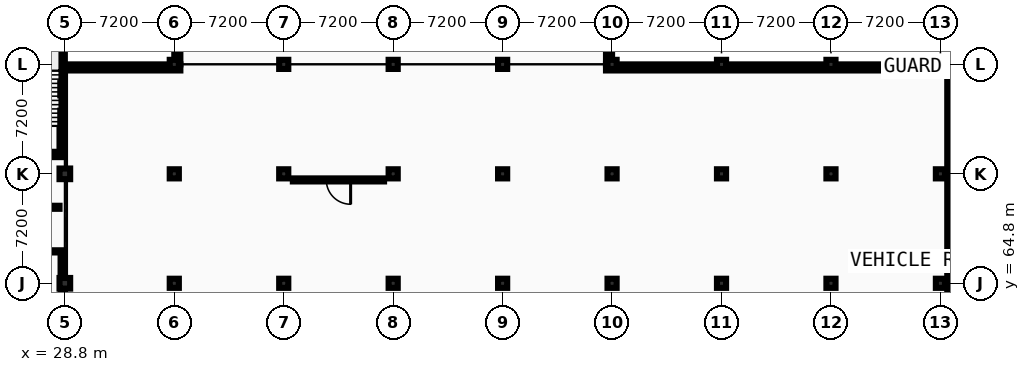
"""IFC4 building model, lengths in metres.
Left out: names, types, materials, properties, quantities, classifications, styles, units other than length and angle.
Written with IfcOpenShell. Run it as: python <this file> out.ifc"""

import sys

from ifc_helpers import new_model, si_unit, direction, frame, frame_2d, origin, origin_2d, place, context, subcontext, project, spatial, rectangle, extrude, element, fill, save


model = new_model("IFC4")
c1 = context("Model", 3, precision=1e-05, world=origin(), true_north=direction((0.0, 1.0)))
c2 = subcontext(c1, "Body", "Model", "MODEL_VIEW")
j1 = project(units=[si_unit("LENGTHUNIT", "METRE"), si_unit("PLANEANGLEUNIT", "RADIAN")], contexts=[c1])
p1 = place(None, origin())
s1 = spatial("IfcSite", under=j1, at=p1, CompositionType="ELEMENT")
p2 = place(p1, origin())
s2 = spatial("IfcBuilding", under=s1, at=p2, CompositionType="ELEMENT")
p3 = place(p2, frame((0.0, 0.0, -4.8)))
s3 = spatial("IfcBuildingStorey", under=s2, at=p3, CompositionType="ELEMENT", Elevation=-4.8)
for number, where, z_axis, x_axis in (
    (1, (28.8, 64.8, 0.0), (0.0, 0.0, 1.0), (1.0, 0.0, 0.0)),
    (2, (28.8, 72.0, 0.0), (0.0, 0.0, 1.0), (1.0, 0.0, 0.0)),
):
    element("IfcColumn", number, at=place(p3, frame(where, z_axis=z_axis, x_axis=x_axis)), inside=s3, PredefinedType="COLUMN", context=c2, shape_type="SweptSolid", body=[
        extrude(rectangle(XDim=0.7, YDim=0.7, at=origin_2d()), origin(), (0.0, 0.0, 1.0), 4.8),
    ])
for number, where, z_axis, x_axis in (
    (3, (36.0, 64.8, 0.0), (0.0, 0.0, 1.0), (1.0, 0.0, 0.0)),
    (4, (36.0, 72.0, 0.0), (0.0, 0.0, 1.0), (1.0, 0.0, 0.0)),
    (5, (36.0, 79.2, 0.0), (0.0, 0.0, 1.0), (1.0, 0.0, 0.0)),
    (6, (43.2, 64.8, 0.0), (0.0, 0.0, 1.0), (1.0, 0.0, 0.0)),
    (7, (43.2, 72.0, 0.0), (0.0, 0.0, 1.0), (1.0, 0.0, 0.0)),
    (8, (43.2, 79.2, 0.0), (0.0, 0.0, 1.0), (1.0, 0.0, 0.0)),
    (9, (50.4, 64.8, 0.0), (0.0, 0.0, 1.0), (1.0, 0.0, 0.0)),
    (10, (50.4, 72.0, 0.0), (0.0, 0.0, 1.0), (1.0, 0.0, 0.0)),
    (11, (50.4, 79.2, 0.0), (0.0, 0.0, 1.0), (1.0, 0.0, 0.0)),
    (12, (57.6, 64.8, 0.0), (0.0, 0.0, 1.0), (1.0, 0.0, 0.0)),
    (13, (57.6, 72.0, 0.0), (0.0, 0.0, 1.0), (1.0, 0.0, 0.0)),
    (14, (57.6, 79.2, 0.0), (0.0, 0.0, 1.0), (1.0, 0.0, 0.0)),
    (15, (64.8, 64.8, 0.0), (0.0, 0.0, 1.0), (1.0, 0.0, 0.0)),
    (16, (64.8, 72.0, 0.0), (0.0, 0.0, 1.0), (1.0, 0.0, 0.0)),
    (17, (64.8, 79.2, 0.0), (0.0, 0.0, 1.0), (1.0, 0.0, 0.0)),
    (18, (72.0, 64.8, 0.0), (0.0, 0.0, 1.0), (1.0, 0.0, 0.0)),
    (19, (72.0, 72.0, 0.0), (0.0, 0.0, 1.0), (1.0, 0.0, 0.0)),
    (20, (72.0, 79.2, 0.0), (0.0, 0.0, 1.0), (1.0, 0.0, 0.0)),
    (21, (79.2, 64.8, 0.0), (0.0, 0.0, 1.0), (1.0, 0.0, 0.0)),
    (22, (79.2, 72.0, 0.0), (0.0, 0.0, 1.0), (1.0, 0.0, 0.0)),
    (23, (79.2, 79.2, 0.0), (0.0, 0.0, 1.0), (1.0, 0.0, 0.0)),
    (24, (86.4, 64.8, 0.0), (0.0, 0.0, 1.0), (1.0, 0.0, 0.0)),
    (25, (86.4, 72.0, 0.0), (0.0, 0.0, 1.0), (1.0, 0.0, 0.0)),
    (26, (86.4, 79.2, 0.0), (0.0, 0.0, 1.0), (1.0, 0.0, 0.0)),
):
    element("IfcColumn", number, at=place(p3, frame(where, z_axis=z_axis, x_axis=x_axis)), inside=s3, PredefinedType="COLUMN", context=c2, shape_type="SweptSolid", body=[
        extrude(rectangle(XDim=0.6, YDim=0.6, at=origin_2d()), origin(), (0.0, 0.0, 1.0), 4.8),
    ])
p4 = place(p3, frame((93.6, 79.0, 0.0), z_axis=(0.0, 0.0, 1.0), x_axis=(-1.0, 0.0, 0.0)))
e27 = element("IfcWall", 27, at=p4, inside=s3, PredefinedType="USERDEFINED", context=c2, shape_type="SweptSolid", body=[
    extrude(rectangle(XDim=29.2, YDim=0.4, at=frame_2d((14.6, 0.0))), origin(), (0.0, 0.0, 1.0), 4.545),
])
for number, where, z_axis, x_axis in (
    (28, (64.6, 79.2, 0.0), (0.0, 0.0, 1.0), (0.0, 1.0, 0.0)),
    (29, (36.2, 117.6, 0.0), (0.0, 0.0, 1.0), (0.0, -1.0, 0.0)),
):
    element("IfcWall", number, at=place(p3, frame(where, z_axis=z_axis, x_axis=x_axis)), inside=s3, PredefinedType="USERDEFINED", context=c2, shape_type="SweptSolid", body=[
        extrude(rectangle(XDim=38.4, YDim=0.4, at=frame_2d((19.2, 0.0))), origin(), (0.0, 0.0, 1.0), 4.545),
    ])
p5 = place(p3, frame((36.4, 79.0, 0.0), z_axis=(0.0, 0.0, 1.0), x_axis=(-1.0, 0.0, 0.0)))
e30 = element("IfcWall", 30, at=p5, inside=s3, PredefinedType="USERDEFINED", context=c2, shape_type="SweptSolid", body=[
    extrude(rectangle(XDim=8.0, YDim=0.4, at=frame_2d((4.0, 0.0))), origin(), (0.0, 0.0, 1.0), 4.545),
])
p6 = place(p3, frame((87.025, 63.0, 0.0), z_axis=(0.0, 0.0, 1.0), x_axis=(0.0, 1.0, 0.0)))
e31 = element("IfcWall", 31, at=p6, inside=s3, PredefinedType="USERDEFINED", context=c2, shape_type="SweptSolid", body=[
    extrude(rectangle(XDim=15.8, YDim=0.35, at=frame_2d((7.9, 0.0))), origin(), (0.0, 0.0, 1.0), 4.58),
])
p7 = place(p3, frame((24.95, 73.275, 0.0), z_axis=(0.0, 0.0, 1.0), x_axis=(1.0, 0.0, 0.0)))
e32 = element("IfcWall", 32, at=p7, inside=s3, PredefinedType="SHEAR", context=c2, shape_type="SweptSolid", body=[
    extrude(rectangle(XDim=3.85, YDim=0.35, at=frame_2d((1.925, 0.0))), origin(), (0.0, 0.0, 1.0), 4.545),
])
p8 = place(p7, frame((1.375, 0.0, 0.0)))
e33 = element("IfcOpeningElement", 33, at=p8, cuts=e32, PredefinedType="OPENING", context=c2, shape_type="SweptSolid", body=[
    extrude(rectangle(XDim=1.1, YDim=2.15, at=frame_2d((0.55, 1.075))), frame((0.0, 0.185, 0.0), z_axis=(0.0, -1.0, 0.0), x_axis=(1.0, 0.0, 0.0)), (0.0, 0.0, 1.0), 0.37),
])
p9 = place(p3, frame((28.625, 73.45, 0.0), z_axis=(0.0, 0.0, 1.0), x_axis=(0.0, 1.0, 0.0)))
e34 = element("IfcWall", 34, at=p9, inside=s3, PredefinedType="SHEAR", context=c2, shape_type="SweptSolid", body=[
    extrude(rectangle(XDim=7.8, YDim=0.35, at=frame_2d((3.9, 0.0))), origin(), (0.0, 0.0, 1.0), 4.545),
])
p10 = place(p3, frame((22.85, 69.8, 0.0), z_axis=(0.0, 0.0, 1.0), x_axis=(1.0, 0.0, 0.0)))
e35 = element("IfcWall", 35, at=p10, inside=s3, PredefinedType="PARTITIONING", context=c2, shape_type="SweptSolid", body=[
    extrude(rectangle(XDim=5.6, YDim=0.2, at=frame_2d((2.8, 0.0))), origin(), (0.0, 0.0, 1.0), 4.545),
])
p11 = place(p10, frame((2.0, 0.0, 0.0)))
e36 = element("IfcOpeningElement", 36, at=p11, cuts=e35, PredefinedType="OPENING", context=c2, shape_type="SweptSolid", body=[
    extrude(rectangle(XDim=1.6, YDim=2.2, at=frame_2d((0.8, 1.1))), frame((0.0, 0.11, 0.0), z_axis=(0.0, -1.0, 0.0), x_axis=(1.0, 0.0, 0.0)), (0.0, 0.0, 1.0), 0.22),
])
p12 = place(p3, frame((21.25, 66.9, 0.0), z_axis=(0.0, 0.0, 1.0), x_axis=(1.0, 0.0, 0.0)))
e37 = element("IfcWall", 37, at=p12, inside=s3, PredefinedType="PARTITIONING", context=c2, shape_type="SweptSolid", body=[
    extrude(rectangle(XDim=7.35, YDim=0.142, at=frame_2d((3.675, 0.0))), origin(), (0.0, 0.0, 1.0), 4.545),
])
p13 = place(p12, frame((3.209, 0.0, 0.0)))
e38 = element("IfcOpeningElement", 38, at=p13, cuts=e37, PredefinedType="OPENING", context=c2, shape_type="SweptSolid", body=[
    extrude(rectangle(XDim=0.932, YDim=2.068, at=frame_2d((0.466, 1.034))), frame((0.0, 0.081, 0.0), z_axis=(0.0, -1.0, 0.0), x_axis=(1.0, 0.0, 0.0)), (0.0, 0.0, 1.0), 0.162),
])
p14 = place(p3, frame((28.6, 57.98, 0.0), z_axis=(0.0, 0.0, 1.0), x_axis=(0.0, 1.0, 0.0)))
e39 = element("IfcWall", 39, at=p14, inside=s3, PredefinedType="PARTITIONING", context=c2, shape_type="SweptSolid", body=[
    extrude(rectangle(XDim=6.44, YDim=0.135, at=frame_2d((3.22, 0.0))), origin(), (0.0, 0.0, 1.0), 4.235),
])
p15 = place(p3, frame((28.6, 65.18, 0.0), z_axis=(0.0, 0.0, 1.0), x_axis=(0.0, 1.0, 0.0)))
e40 = element("IfcWall", 40, at=p15, inside=s3, PredefinedType="PARTITIONING", context=c2, shape_type="SweptSolid", body=[
    extrude(rectangle(XDim=1.649, YDim=0.16, at=frame_2d((0.825, 0.0))), origin(), (0.0, 0.0, 1.0), 4.235),
])
p16 = place(p3, frame((43.8, 71.6, 0.0), z_axis=(0.0, 0.0, 1.0), x_axis=(1.0, 0.0, 0.0)))
e41 = element("IfcWall", 41, at=p16, inside=s3, PredefinedType="PARTITIONING", context=c2, shape_type="SweptSolid", body=[
    extrude(rectangle(XDim=6.0, YDim=0.2, at=frame_2d((3.0, 0.0))), origin(), (0.0, 0.0, 1.0), 4.45),
])
p17 = place(p16, frame((2.2, 0.0, 0.0)))
e42 = element("IfcOpeningElement", 42, at=p17, cuts=e41, PredefinedType="OPENING", context=c2, shape_type="SweptSolid", body=[
    extrude(rectangle(XDim=1.6, YDim=2.2, at=frame_2d((0.8, 1.1))), frame((0.0, 0.11, 0.0), z_axis=(0.0, -1.0, 0.0), x_axis=(1.0, 0.0, 0.0)), (0.0, 0.0, 1.0), 0.22),
])
p18 = place(p17, origin())
e43 = element("IfcDoor", 43, at=p18, inside=s3, OperationType="DOUBLE_DOOR_SINGLE_SWING", PredefinedType="DOOR", context=c2, shape_type="SweptSolid", body=[
    extrude(rectangle(XDim=1.6, YDim=2.2, at=frame_2d((0.8, 1.1))), frame((0.0, 0.025, 0.0), z_axis=(0.0, -1.0, 0.0), x_axis=(1.0, 0.0, 0.0)), (0.0, 0.0, 1.0), 0.05),
])
fill(e42, e43)
save(model, sys.argv[1])
